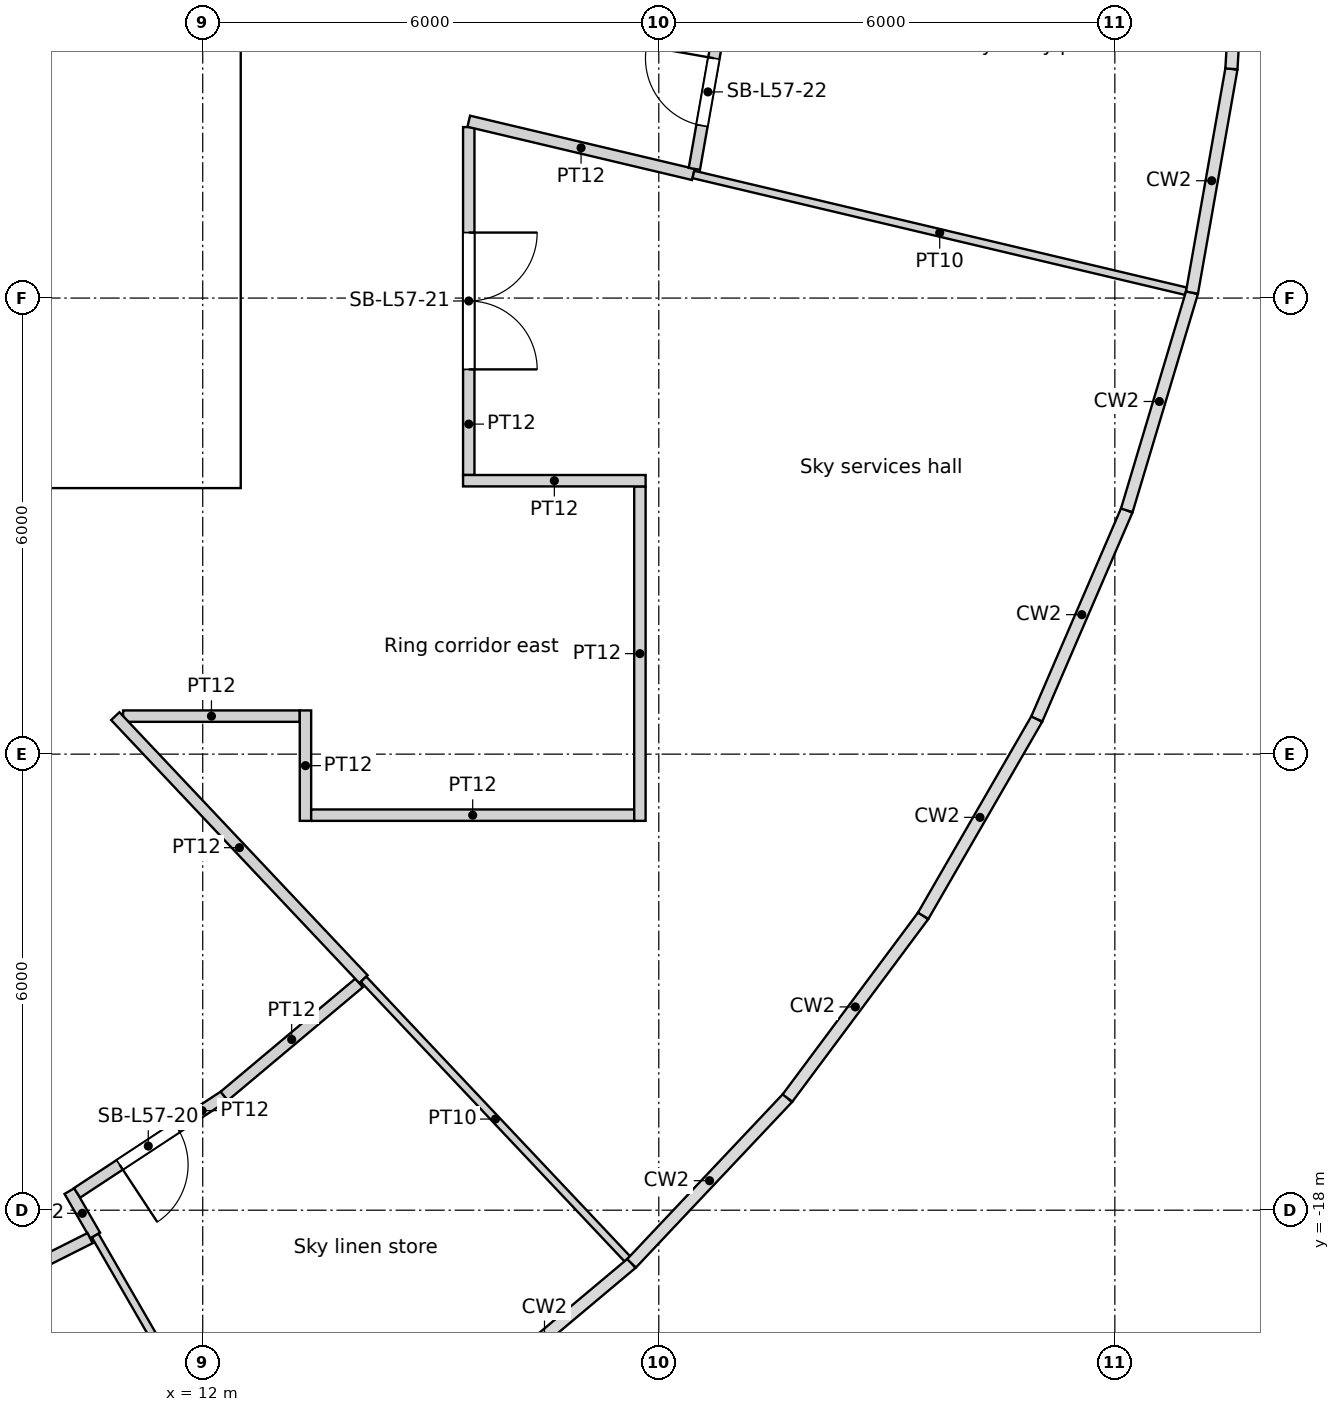
"""IFC4 building model, lengths in metres.
Left out: names, types, materials, properties, quantities, classifications, styles, units other than length and angle.
Written with IfcOpenShell. Run it as: python <this file> out.ifc"""

import sys

from ifc_helpers import new_model, si_unit, direction, frame, frame_2d, origin, origin_2d, place, context, subcontext, project, spatial, rectangle, circle, extrude, element, fill, save


model = new_model("IFC4")
c1 = context("Model", 3, precision=1e-05, world=origin(), true_north=direction((0.0, 1.0)))
c2 = subcontext(c1, "Body", "Model", "MODEL_VIEW")
j1 = project(units=[si_unit("LENGTHUNIT", "METRE"), si_unit("PLANEANGLEUNIT", "RADIAN")], contexts=[c1])
p1 = place(None, origin())
s1 = spatial("IfcSite", under=j1, at=p1, CompositionType="ELEMENT")
p2 = place(p1, origin())
s2 = spatial("IfcBuilding", under=s1, at=p2, CompositionType="ELEMENT")
p3 = place(p2, frame((0.0, 0.0, 219.6)))
s3 = spatial("IfcBuildingStorey", under=s2, at=p3, CompositionType="ELEMENT", Elevation=219.6)
for number, where, z_axis, x_axis in (
    (1, (14.659, -19.69, 0.0), (0.0, 0.0, 1.0), (1.0, 0.0, 0.0)),
    (2, (18.805, -15.779, 0.0), (0.0, 0.0, 1.0), (1.0, 0.0, 0.0)),
    (3, (21.937, -11.017, 0.0), (0.0, 0.0, 1.0), (1.0, 0.0, 0.0)),
    (4, (23.886, -5.661, 0.0), (0.0, 0.0, 1.0), (1.0, 0.0, 0.0)),
):
    element("IfcColumn", number, at=place(p3, frame(where, z_axis=z_axis, x_axis=x_axis)), inside=s3, PredefinedType="COLUMN", context=c2, shape_type="SweptSolid", body=[
        extrude(circle(Radius=0.6, at=origin_2d()), origin(), (0.0, 0.0, 1.0), 5.4),
    ])
for number, where, z_axis, x_axis in (
    (5, (11.735, -14.716, 0.0), (0.0, 0.0, 1.0), (1.0, 0.0, 0.0)),
    (6, (15.552, -10.603, 0.0), (0.0, 0.0, 1.0), (1.0, 0.0, 0.0)),
    (7, (17.986, -5.548, 0.0), (0.0, 0.0, 1.0), (1.0, 0.0, 0.0)),
):
    element("IfcColumn", number, at=place(p3, frame(where, z_axis=z_axis, x_axis=x_axis)), inside=s3, PredefinedType="COLUMN", context=c2, shape_type="SweptSolid", body=[
        extrude(circle(Radius=0.65, at=origin_2d()), origin(), (0.0, 0.0, 1.0), 5.4),
    ])
p4 = place(p3, frame((-12.5, -8.05, 0.0), z_axis=(0.0, 0.0, 1.0), x_axis=(1.0, 0.0, 0.0)))
e8 = element("IfcWall", 8, at=p4, inside=s3, PredefinedType="SOLIDWALL", context=c2, shape_type="SweptSolid", body=[
    extrude(rectangle(XDim=25.0, YDim=0.9, at=frame_2d((12.5, 0.0))), origin(), (0.0, 0.0, 1.0), 5.4),
])
p5 = place(p4, frame((13.4, 0.0, 0.0)))
e9 = element("IfcOpeningElement", 9, at=p5, cuts=e8, PredefinedType="OPENING", context=c2, shape_type="SweptSolid", body=[
    extrude(rectangle(XDim=1.0, YDim=2.1, at=frame_2d((0.5, 1.05))), frame((0.0, 0.45, 0.0), z_axis=(0.0, -1.0, 0.0), x_axis=(1.0, 0.0, 0.0)), (0.0, 0.0, 1.0), 0.9),
])
p6 = place(p4, frame((8.3, 0.0, 0.0)))
e10 = element("IfcOpeningElement", 10, at=p6, cuts=e8, PredefinedType="OPENING", context=c2, shape_type="SweptSolid", body=[
    extrude(rectangle(XDim=1.8, YDim=2.1, at=frame_2d((0.9, 1.05))), frame((0.0, 0.45, 0.0), z_axis=(0.0, -1.0, 0.0), x_axis=(1.0, 0.0, 0.0)), (0.0, 0.0, 1.0), 0.9),
])
p7 = place(p4, frame((14.9, 0.0, 0.0)))
e11 = element("IfcOpeningElement", 11, at=p7, cuts=e8, PredefinedType="OPENING", context=c2, shape_type="SweptSolid", body=[
    extrude(rectangle(XDim=1.8, YDim=2.1, at=frame_2d((0.9, 1.05))), frame((0.0, 0.45, 0.0), z_axis=(0.0, -1.0, 0.0), x_axis=(1.0, 0.0, 0.0)), (0.0, 0.0, 1.0), 0.9),
])
p8 = place(p3, frame((12.05, -7.6, 0.0), z_axis=(0.0, 0.0, 1.0), x_axis=(0.0, 1.0, 0.0)))
e12 = element("IfcWall", 12, at=p8, inside=s3, PredefinedType="SOLIDWALL", context=c2, shape_type="SweptSolid", body=[
    extrude(rectangle(XDim=15.2, YDim=0.9, at=frame_2d((7.6, 0.0))), origin(), (0.0, 0.0, 1.0), 5.4),
])
p9 = place(p8, frame((5.1, 0.0, 0.0)))
e13 = element("IfcOpeningElement", 13, at=p9, cuts=e12, PredefinedType="OPENING", context=c2, shape_type="SweptSolid", body=[
    extrude(rectangle(XDim=1.0, YDim=2.1, at=frame_2d((0.5, 1.05))), frame((0.0, 0.45, 0.0), z_axis=(0.0, -1.0, 0.0), x_axis=(1.0, 0.0, 0.0)), (0.0, 0.0, 1.0), 0.9),
])
p10 = place(p3, frame((9.2, -4.55, 0.0), z_axis=(0.0, 0.0, 1.0), x_axis=(1.0, 0.0, 0.0)))
e14 = element("IfcWall", 14, at=p10, inside=s3, PredefinedType="SOLIDWALL", context=c2, shape_type="SweptSolid", body=[
    extrude(rectangle(XDim=2.4, YDim=0.3, at=frame_2d((1.2, 0.0))), origin(), (0.0, 0.0, 1.0), 4.9),
])
p11 = place(p10, frame((0.65, 0.0, 0.0)))
e15 = element("IfcOpeningElement", 15, at=p11, cuts=e14, PredefinedType="OPENING", context=c2, shape_type="SweptSolid", body=[
    extrude(rectangle(XDim=1.1, YDim=2.1, at=frame_2d((0.55, 1.05))), frame((0.0, 0.15, 0.0), z_axis=(0.0, -1.0, 0.0), x_axis=(1.0, 0.0, 0.0)), (0.0, 0.0, 1.0), 0.3),
])
p12 = place(p3, frame((8.385, -19.438, 0.0), z_axis=(0.0, 0.0, 1.0), x_axis=(0.893607371845, 0.448849490345, 0.0)))
e16 = element("IfcWall", 16, at=p12, inside=s3, PredefinedType="PARTITIONING", context=c2, shape_type="SweptSolid", body=[
    extrude(rectangle(XDim=2.387, YDim=0.15, at=frame_2d((1.193, 0.0))), origin(), (0.0, 0.0, 1.0), 4.1),
])
p13 = place(p3, frame((12.283, -16.499, 0.0), z_axis=(0.0, 0.0, 1.0), x_axis=(-0.835487102144, -0.549510056461, 0.0)))
e17 = element("IfcWall", 17, at=p13, inside=s3, PredefinedType="PARTITIONING", context=c2, shape_type="SweptSolid", body=[
    extrude(rectangle(XDim=2.317, YDim=0.15, at=frame_2d((1.158, 0.0))), origin(), (0.0, 0.0, 1.0), 4.1),
])
p14 = place(p13, frame((0.746, 0.0, 0.0)))
e18 = element("IfcOpeningElement", 18, at=p14, cuts=e17, PredefinedType="OPENING", context=c2, shape_type="SweptSolid", body=[
    extrude(rectangle(XDim=0.9, YDim=2.1, at=frame_2d((0.45, 1.05))), frame((0.0, 0.075, 0.0), z_axis=(0.0, -1.0, 0.0), x_axis=(1.0, 0.0, 0.0)), (0.0, 0.0, 1.0), 0.15),
])
p15 = place(p3, frame((10.585, -18.333, 0.0), z_axis=(0.0, 0.0, 1.0), x_axis=(-0.500139216719, 0.865945012053, 0.0)))
e19 = element("IfcWall", 19, at=p15, inside=s3, PredefinedType="PARTITIONING", context=c2, shape_type="SweptSolid", body=[
    extrude(rectangle(XDim=0.676, YDim=0.15, at=frame_2d((0.338, 0.0))), origin(), (0.0, 0.0, 1.0), 4.1),
])
p16 = place(p3, frame((10.953, -11.5, 0.0), z_axis=(0.0, 0.0, 1.0), x_axis=(1.0, 0.0, 0.0)))
e20 = element("IfcWall", 20, at=p16, inside=s3, PredefinedType="PARTITIONING", context=c2, shape_type="SweptSolid", body=[
    extrude(rectangle(XDim=2.324, YDim=0.15, at=frame_2d((1.162, 0.0))), origin(), (0.0, 0.0, 1.0), 4.1),
])
p17 = place(p3, frame((12.283, -16.499, 0.0), z_axis=(0.0, 0.0, 1.0), x_axis=(0.766014097989, 0.642823771871, 0.0)))
e21 = element("IfcWall", 21, at=p17, inside=s3, PredefinedType="PARTITIONING", context=c2, shape_type="SweptSolid", body=[
    extrude(rectangle(XDim=2.317, YDim=0.15, at=frame_2d((1.158, 0.0))), origin(), (0.0, 0.0, 1.0), 4.1),
])
p18 = place(p3, frame((12.814, -22.194, 0.0), z_axis=(0.0, 0.0, 1.0), x_axis=(-0.499973719246, 0.866040576453, 0.0)))
e22 = element("IfcWall", 22, at=p18, inside=s3, PredefinedType="PARTITIONING", context=c2, shape_type="SweptSolid", body=[
    extrude(rectangle(XDim=4.458, YDim=0.1, at=frame_2d((2.229, 0.0))), origin(), (0.0, 0.0, 1.0), 4.1),
])
p19 = place(p3, frame((13.427, -12.803, 0.0), z_axis=(0.0, 0.0, 1.0), x_axis=(1.0, 0.0, 0.0)))
e23 = element("IfcWall", 23, at=p19, inside=s3, PredefinedType="PARTITIONING", context=c2, shape_type="SweptSolid", body=[
    extrude(rectangle(XDim=4.25, YDim=0.15, at=frame_2d((2.125, 0.0))), origin(), (0.0, 0.0, 1.0), 4.1),
])
p20 = place(p3, frame((13.352, -11.425, 0.0), z_axis=(0.0, 0.0, 1.0), x_axis=(0.0, -1.0, 0.0)))
e24 = element("IfcWall", 24, at=p20, inside=s3, PredefinedType="PARTITIONING", context=c2, shape_type="SweptSolid", body=[
    extrude(rectangle(XDim=1.453, YDim=0.15, at=frame_2d((0.727, 0.0))), origin(), (0.0, 0.0, 1.0), 4.1),
])
p21 = place(p3, frame((14.115, -14.961, 0.0), z_axis=(0.0, 0.0, 1.0), x_axis=(-0.686260376194, 0.727355962418, 0.0)))
e25 = element("IfcWall", 25, at=p21, inside=s3, PredefinedType="PARTITIONING", context=c2, shape_type="SweptSolid", body=[
    extrude(rectangle(XDim=4.759, YDim=0.15, at=frame_2d((2.379, 0.0))), origin(), (0.0, 0.0, 1.0), 4.1),
])
p22 = place(p3, frame((15.5, -3.751, 0.0), z_axis=(0.0, 0.0, 1.0), x_axis=(0.0, -1.0, 0.0)))
e26 = element("IfcWall", 26, at=p22, inside=s3, PredefinedType="PARTITIONING", context=c2, shape_type="SweptSolid", body=[
    extrude(rectangle(XDim=4.577, YDim=0.15, at=frame_2d((2.289, 0.0))), origin(), (0.0, 0.0, 1.0), 4.1),
])
p23 = place(p22, frame((1.388, 0.0, 0.0)))
e27 = element("IfcOpeningElement", 27, at=p23, cuts=e26, PredefinedType="OPENING", context=c2, shape_type="SweptSolid", body=[
    extrude(rectangle(XDim=1.8, YDim=2.4, at=frame_2d((0.9, 1.2))), frame((0.0, 0.075, 0.0), z_axis=(0.0, -1.0, 0.0), x_axis=(1.0, 0.0, 0.0)), (0.0, 0.0, 1.0), 0.15),
])
p24 = place(p3, frame((17.587, -18.641, 0.0), z_axis=(0.0, 0.0, 1.0), x_axis=(-0.686247889533, 0.727367743382, 0.0)))
e28 = element("IfcWall", 28, at=p24, inside=s3, PredefinedType="PARTITIONING", context=c2, shape_type="SweptSolid", body=[
    extrude(rectangle(XDim=5.059, YDim=0.1, at=frame_2d((2.529, 0.0))), origin(), (0.0, 0.0, 1.0), 4.1),
])
p25 = place(p3, frame((17.752, -12.878, 0.0), z_axis=(0.0, 0.0, 1.0), x_axis=(0.0, 1.0, 0.0)))
e29 = element("IfcWall", 29, at=p25, inside=s3, PredefinedType="PARTITIONING", context=c2, shape_type="SweptSolid", body=[
    extrude(rectangle(XDim=4.4, YDim=0.15, at=frame_2d((2.2, 0.0))), origin(), (0.0, 0.0, 1.0), 4.1),
])
p26 = place(p3, frame((17.827, -8.403, 0.0), z_axis=(0.0, 0.0, 1.0), x_axis=(-1.0, 0.0, 0.0)))
e30 = element("IfcWall", 30, at=p26, inside=s3, PredefinedType="PARTITIONING", context=c2, shape_type="SweptSolid", body=[
    extrude(rectangle(XDim=2.402, YDim=0.15, at=frame_2d((1.201, 0.0))), origin(), (0.0, 0.0, 1.0), 4.1),
])
p27 = place(p3, frame((18.455, -4.374, 0.0), z_axis=(0.0, 0.0, 1.0), x_axis=(-0.973053235534, 0.230580573371, 0.0)))
e31 = element("IfcWall", 31, at=p27, inside=s3, PredefinedType="PARTITIONING", context=c2, shape_type="SweptSolid", body=[
    extrude(rectangle(XDim=3.037, YDim=0.15, at=frame_2d((1.518, 0.0))), origin(), (0.0, 0.0, 1.0), 4.1),
])
p28 = place(p3, frame((18.838, -2.202, 0.0), z_axis=(0.0, 0.0, 1.0), x_axis=(-0.173628421176, -0.98481123641, 0.0)))
e32 = element("IfcWall", 32, at=p28, inside=s3, PredefinedType="PARTITIONING", context=c2, shape_type="SweptSolid", body=[
    extrude(rectangle(XDim=2.13, YDim=0.15, at=frame_2d((1.065, 0.0))), origin(), (0.0, 0.0, 1.0), 4.1),
])
p29 = place(p28, frame((0.653, 0.0, 0.0)))
e33 = element("IfcOpeningElement", 33, at=p29, cuts=e32, PredefinedType="OPENING", context=c2, shape_type="SweptSolid", body=[
    extrude(rectangle(XDim=0.9, YDim=2.1, at=frame_2d((0.45, 1.05))), frame((0.0, 0.075, 0.0), z_axis=(0.0, -1.0, 0.0), x_axis=(1.0, 0.0, 0.0)), (0.0, 0.0, 1.0), 0.15),
])
p30 = place(p3, frame((24.937, -5.91, 0.0), z_axis=(0.0, 0.0, 1.0), x_axis=(-0.973038525817, 0.230642639759, 0.0)))
e34 = element("IfcWall", 34, at=p30, inside=s3, PredefinedType="PARTITIONING", context=c2, shape_type="SweptSolid", body=[
    extrude(rectangle(XDim=6.661, YDim=0.1, at=frame_2d((3.331, 0.0))), origin(), (0.0, 0.0, 1.0), 4.1),
])
p31 = place(p11, origin())
e35 = element("IfcDoor", 35, at=p31, inside=s3, OperationType="SLIDING_TO_RIGHT", PredefinedType="DOOR", context=c2, shape_type="SweptSolid", body=[
    extrude(rectangle(XDim=1.1, YDim=2.1, at=frame_2d((0.55, 1.05))), frame((0.0, 0.025, 0.0), z_axis=(0.0, -1.0, 0.0), x_axis=(1.0, 0.0, 0.0)), (0.0, 0.0, 1.0), 0.05),
])
fill(e15, e35)
p32 = place(p14, origin())
e36 = element("IfcDoor", 36, at=p32, inside=s3, OperationType="SINGLE_SWING_RIGHT", PredefinedType="DOOR", context=c2, shape_type="SweptSolid", body=[
    extrude(rectangle(XDim=0.9, YDim=2.1, at=frame_2d((0.45, 1.05))), frame((0.0, 0.025, 0.0), z_axis=(0.0, -1.0, 0.0), x_axis=(1.0, 0.0, 0.0)), (0.0, 0.0, 1.0), 0.05),
])
fill(e18, e36)
p33 = place(p23, origin())
e37 = element("IfcDoor", 37, at=p33, inside=s3, OperationType="DOUBLE_DOOR_SINGLE_SWING", PredefinedType="DOOR", context=c2, shape_type="SweptSolid", body=[
    extrude(rectangle(XDim=1.8, YDim=2.4, at=frame_2d((0.9, 1.2))), frame((0.0, 0.025, 0.0), z_axis=(0.0, -1.0, 0.0), x_axis=(1.0, 0.0, 0.0)), (0.0, 0.0, 1.0), 0.05),
])
fill(e27, e37)
p34 = place(p29, origin())
e38 = element("IfcDoor", 38, at=p34, inside=s3, OperationType="SINGLE_SWING_RIGHT", PredefinedType="DOOR", context=c2, shape_type="SweptSolid", body=[
    extrude(rectangle(XDim=0.9, YDim=2.1, at=frame_2d((0.45, 1.05))), frame((0.0, 0.025, 0.0), z_axis=(0.0, -1.0, 0.0), x_axis=(1.0, 0.0, 0.0)), (0.0, 0.0, 1.0), 0.05),
])
fill(e33, e38)
save(model, sys.argv[1])
